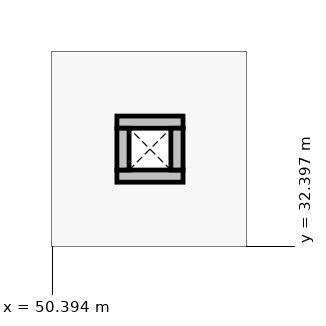
"""IFC4 building model, lengths in metres.
Left out: names, types, materials, properties, quantities, classifications, styles, units other than length and angle.
Written with IfcOpenShell. Run it as: python <this file> out.ifc"""

import sys

from ifc_helpers import new_model, si_unit, direction, frame, frame_2d, origin, place, context, subcontext, project, spatial, rectangle, extrude, element, save


model = new_model("IFC4")
c1 = context("Model", 3, precision=1e-05, world=origin(), true_north=direction((0.0, 1.0)))
c2 = subcontext(c1, "Body", "Model", "MODEL_VIEW")
j1 = project(units=[si_unit("LENGTHUNIT", "METRE"), si_unit("PLANEANGLEUNIT", "RADIAN")], contexts=[c1])
p1 = place(None, origin())
s1 = spatial("IfcSite", under=j1, at=p1, CompositionType="ELEMENT")
p2 = place(p1, origin())
s2 = spatial("IfcBuilding", under=s1, at=p2, CompositionType="ELEMENT")
p3 = place(p2, frame((0.0, 0.0, 4.8)))
s3 = spatial("IfcBuildingStorey", under=s2, at=p3, CompositionType="ELEMENT", Elevation=4.8)
for number, where, z_axis, x_axis in (
    (1, (51.24, 33.32, 0.0), (0.0, 0.0, 1.0), (1.0, 0.0, 0.0)),
    (2, (51.24, 34.03, 0.0), (0.0, 0.0, 1.0), (1.0, 0.0, 0.0)),
):
    element("IfcWall", number, at=place(p3, frame(where, z_axis=z_axis, x_axis=x_axis)), inside=s3, PredefinedType="PARTITIONING", context=c2, shape_type="SweptSolid", body=[
        extrude(rectangle(XDim=0.87, YDim=0.16, at=frame_2d((0.435, 0.0))), origin(), (0.0, 0.0, 1.0), 3.35),
    ])
for number, where, z_axis, x_axis in (
    (3, (51.32, 33.4, 0.0), (0.0, 0.0, 1.0), (0.0, 1.0, 0.0)),
    (4, (52.03, 33.4, 0.0), (0.0, 0.0, 1.0), (0.0, 1.0, 0.0)),
):
    element("IfcWall", number, at=place(p3, frame(where, z_axis=z_axis, x_axis=x_axis)), inside=s3, PredefinedType="PARTITIONING", context=c2, shape_type="SweptSolid", body=[
        extrude(rectangle(XDim=0.55, YDim=0.16, at=frame_2d((0.275, 0.0))), origin(), (0.0, 0.0, 1.0), 3.35),
    ])
save(model, sys.argv[1])
